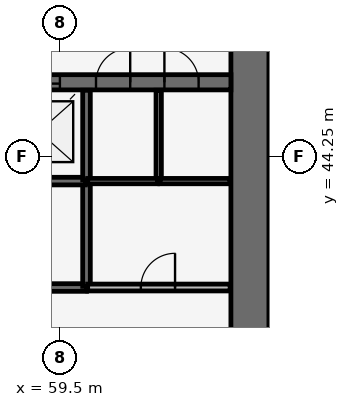
"""IFC4 building model, lengths in metres.
Left out: names, types, materials, properties, quantities, classifications, styles, units other than length and angle.
Written with IfcOpenShell. Run it as: python <this file> out.ifc"""

import sys

from ifc_helpers import new_model, si_unit, direction, frame, frame_2d, origin, place, context, subcontext, project, spatial, rectangle, extrude, source, transform, mapped, element, fill, save


model = new_model("IFC4")
c1 = context("Model", 3, precision=1e-05, world=origin(), true_north=direction((0.0, 1.0)))
c2 = subcontext(c1, "Body", "Model", "MODEL_VIEW")
j1 = project(units=[si_unit("LENGTHUNIT", "METRE"), si_unit("PLANEANGLEUNIT", "RADIAN")], contexts=[c1])
p1 = place(None, origin())
s1 = spatial("IfcSite", under=j1, at=p1, CompositionType="ELEMENT")
p2 = place(p1, origin())
s2 = spatial("IfcBuilding", under=s1, at=p2, CompositionType="ELEMENT")
p3 = place(p2, origin())
s3 = spatial("IfcBuildingStorey", under=s2, at=p3, CompositionType="ELEMENT", Elevation=0.0)
p4 = place(p3, frame((64.5, 38.0, -0.35), z_axis=(0.0, 0.0, 1.0), x_axis=(0.0, 1.0, 0.0)))
e1 = element("IfcWall", 1, at=p4, inside=s3, PredefinedType="SHEAR", context=c2, shape_type="SweptSolid", body=[
    extrude(rectangle(XDim=20.0, YDim=1.0, at=frame_2d((10.0, 0.0))), origin(), (0.0, 0.0, 1.0), 5.35),
])
p5 = place(p4, frame((9.1, 0.0, 0.35)))
e2 = element("IfcOpeningElement", 2, at=p5, cuts=e1, PredefinedType="OPENING", context=c2, shape_type="SweptSolid", body=[
    extrude(rectangle(XDim=1.8, YDim=2.1, at=frame_2d((0.9, 1.05))), frame((0.0, 0.51, 0.0), z_axis=(0.0, -1.0, 0.0), x_axis=(1.0, 0.0, 0.0)), (0.0, 0.0, 1.0), 1.02),
])
p6 = place(p3, frame((40.0, 46.2, -0.35), z_axis=(0.0, 0.0, 1.0), x_axis=(1.0, 0.0, 0.0)))
e3 = element("IfcWall", 3, at=p6, inside=s3, PredefinedType="SHEAR", context=c2, shape_type="SweptSolid", body=[
    extrude(rectangle(XDim=24.0, YDim=0.4, at=frame_2d((12.0, 0.0))), origin(), (0.0, 0.0, 1.0), 5.35),
])
p7 = place(p6, frame((13.4, 0.0, 0.35)))
e4 = element("IfcOpeningElement", 4, at=p7, cuts=e3, PredefinedType="OPENING", context=c2, shape_type="SweptSolid", body=[
    extrude(rectangle(XDim=1.1, YDim=2.1, at=frame_2d((0.55, 1.05))), frame((0.0, 0.21, 0.0), z_axis=(0.0, -1.0, 0.0), x_axis=(1.0, 0.0, 0.0)), (0.0, 0.0, 1.0), 0.42),
])
p8 = place(p6, frame((15.9, 0.0, 0.35)))
e5 = element("IfcOpeningElement", 5, at=p8, cuts=e3, PredefinedType="OPENING", context=c2, shape_type="SweptSolid", body=[
    extrude(rectangle(XDim=1.1, YDim=2.1, at=frame_2d((0.55, 1.05))), frame((0.0, 0.21, 0.0), z_axis=(0.0, -1.0, 0.0), x_axis=(1.0, 0.0, 0.0)), (0.0, 0.0, 1.0), 0.42),
])
p9 = place(p6, frame((18.4, 0.0, 0.35)))
e6 = element("IfcOpeningElement", 6, at=p9, cuts=e3, PredefinedType="OPENING", context=c2, shape_type="SweptSolid", body=[
    extrude(rectangle(XDim=1.1, YDim=2.1, at=frame_2d((0.55, 1.05))), frame((0.0, 0.21, 0.0), z_axis=(0.0, -1.0, 0.0), x_axis=(1.0, 0.0, 0.0)), (0.0, 0.0, 1.0), 0.42),
])
p10 = place(p6, frame((4.5, 0.0, 0.35)))
e7 = element("IfcOpeningElement", 7, at=p10, cuts=e3, PredefinedType="OPENING", context=c2, shape_type="SweptSolid", body=[
    extrude(rectangle(XDim=1.1, YDim=2.1, at=frame_2d((0.55, 1.05))), frame((0.0, 0.21, 0.0), z_axis=(0.0, -1.0, 0.0), x_axis=(1.0, 0.0, 0.0)), (0.0, 0.0, 1.0), 0.42),
])
p11 = place(p6, frame((7.0, 0.0, 0.35)))
e8 = element("IfcOpeningElement", 8, at=p11, cuts=e3, PredefinedType="OPENING", context=c2, shape_type="SweptSolid", body=[
    extrude(rectangle(XDim=1.1, YDim=2.1, at=frame_2d((0.55, 1.05))), frame((0.0, 0.21, 0.0), z_axis=(0.0, -1.0, 0.0), x_axis=(1.0, 0.0, 0.0)), (0.0, 0.0, 1.0), 0.42),
])
p12 = place(p6, frame((9.5, 0.0, 0.35)))
e9 = element("IfcOpeningElement", 9, at=p12, cuts=e3, PredefinedType="OPENING", context=c2, shape_type="SweptSolid", body=[
    extrude(rectangle(XDim=1.1, YDim=2.1, at=frame_2d((0.55, 1.05))), frame((0.0, 0.21, 0.0), z_axis=(0.0, -1.0, 0.0), x_axis=(1.0, 0.0, 0.0)), (0.0, 0.0, 1.0), 0.42),
])
p13 = place(p6, frame((20.45, 0.0, 0.35)))
e10 = element("IfcOpeningElement", 10, at=p13, cuts=e3, PredefinedType="OPENING", context=c2, shape_type="SweptSolid", body=[
    extrude(rectangle(XDim=0.9, YDim=2.1, at=frame_2d((0.45, 1.05))), frame((0.0, 0.21, 0.0), z_axis=(0.0, -1.0, 0.0), x_axis=(1.0, 0.0, 0.0)), (0.0, 0.0, 1.0), 0.42),
])
p14 = place(p6, frame((22.25, 0.0, 0.35)))
e11 = element("IfcOpeningElement", 11, at=p14, cuts=e3, PredefinedType="OPENING", context=c2, shape_type="SweptSolid", body=[
    extrude(rectangle(XDim=0.9, YDim=2.1, at=frame_2d((0.45, 1.05))), frame((0.0, 0.21, 0.0), z_axis=(0.0, -1.0, 0.0), x_axis=(1.0, 0.0, 0.0)), (0.0, 0.0, 1.0), 0.42),
])
p15 = place(p6, frame((0.85, 0.0, 0.35)))
e12 = element("IfcOpeningElement", 12, at=p15, cuts=e3, PredefinedType="OPENING", context=c2, shape_type="SweptSolid", body=[
    extrude(rectangle(XDim=0.9, YDim=2.1, at=frame_2d((0.45, 1.05))), frame((0.0, 0.21, 0.0), z_axis=(0.0, -1.0, 0.0), x_axis=(1.0, 0.0, 0.0)), (0.0, 0.0, 1.0), 0.42),
])
p16 = place(p6, frame((2.65, 0.0, 0.35)))
e13 = element("IfcOpeningElement", 13, at=p16, cuts=e3, PredefinedType="OPENING", context=c2, shape_type="SweptSolid", body=[
    extrude(rectangle(XDim=0.9, YDim=2.1, at=frame_2d((0.45, 1.05))), frame((0.0, 0.21, 0.0), z_axis=(0.0, -1.0, 0.0), x_axis=(1.0, 0.0, 0.0)), (0.0, 0.0, 1.0), 0.42),
])
p17 = place(p6, frame((11.65, 0.0, 0.35)))
e14 = element("IfcOpeningElement", 14, at=p17, cuts=e3, PredefinedType="OPENING", context=c2, shape_type="SweptSolid", body=[
    extrude(rectangle(XDim=0.9, YDim=2.1, at=frame_2d((0.45, 1.05))), frame((0.0, 0.21, 0.0), z_axis=(0.0, -1.0, 0.0), x_axis=(1.0, 0.0, 0.0)), (0.0, 0.0, 1.0), 0.42),
])
p18 = place(p3, frame((53.6, 40.8, 0.0), z_axis=(0.0, 0.0, 1.0), x_axis=(1.0, 0.0, 0.0)))
e15 = element("IfcWall", 15, at=p18, inside=s3, PredefinedType="SOLIDWALL", context=c2, shape_type="SweptSolid", body=[
    extrude(rectangle(XDim=6.6, YDim=0.2, at=frame_2d((3.3, 0.0))), origin(), (0.0, 0.0, 1.0), 4.65),
])
p19 = place(p18, frame((0.3, 0.0, 0.0)))
e16 = element("IfcOpeningElement", 16, at=p19, cuts=e15, PredefinedType="OPENING", context=c2, shape_type="SweptSolid", body=[
    extrude(rectangle(XDim=1.2, YDim=2.1, at=frame_2d((0.6, 1.05))), frame((0.0, 0.11, 0.0), z_axis=(0.0, -1.0, 0.0), x_axis=(1.0, 0.0, 0.0)), (0.0, 0.0, 1.0), 0.22),
])
p20 = place(p3, frame((60.2, 40.83, 0.0), z_axis=(0.0, 0.0, 1.0), x_axis=(0.0, 1.0, 0.0)))
e17 = element("IfcWall", 17, at=p20, inside=s3, PredefinedType="SOLIDWALL", context=c2, shape_type="SweptSolid", body=[
    extrude(rectangle(XDim=2.77, YDim=0.2, at=frame_2d((1.385, 0.0))), origin(), (0.0, 0.0, 1.0), 4.65),
])
p21 = place(p3, frame((57.73, 43.6, 0.0), z_axis=(0.0, 0.0, 1.0), x_axis=(1.0, 0.0, 0.0)))
e18 = element("IfcWall", 18, at=p21, inside=s3, PredefinedType="SOLIDWALL", context=c2, shape_type="SweptSolid", body=[
    extrude(rectangle(XDim=2.44, YDim=0.2, at=frame_2d((1.22, 0.0))), origin(), (0.0, 0.0, 1.0), 4.65),
])
p22 = place(p3, frame((60.2, 43.63, 0.0), z_axis=(0.0, 0.0, 1.0), x_axis=(0.0, 1.0, 0.0)))
e19 = element("IfcWall", 19, at=p22, inside=s3, PredefinedType="SOLIDWALL", context=c2, shape_type="SweptSolid", body=[
    extrude(rectangle(XDim=2.36, YDim=0.2, at=frame_2d((1.18, 0.0))), origin(), (0.0, 0.0, 1.0), 4.65),
])
p23 = place(p3, frame((60.23, 40.8, 0.0), z_axis=(0.0, 0.0, 1.0), x_axis=(1.0, 0.0, 0.0)))
e20 = element("IfcWall", 20, at=p23, inside=s3, PredefinedType="PARTITIONING", context=c2, shape_type="SweptSolid", body=[
    extrude(rectangle(XDim=3.75, YDim=0.18, at=frame_2d((1.875, 0.0))), origin(), (0.0, 0.0, 1.0), 4.65),
])
p24 = place(p23, frame((1.4, 0.0, 0.0)))
e21 = element("IfcOpeningElement", 21, at=p24, cuts=e20, PredefinedType="OPENING", context=c2, shape_type="SweptSolid", body=[
    extrude(rectangle(XDim=0.9, YDim=2.1, at=frame_2d((0.45, 1.05))), frame((0.0, 0.1, 0.0), z_axis=(0.0, -1.0, 0.0), x_axis=(1.0, 0.0, 0.0)), (0.0, 0.0, 1.0), 0.2),
])
p25 = place(p3, frame((62.1, 43.6, 0.0), z_axis=(0.0, 0.0, 1.0), x_axis=(0.0, 1.0, 0.0)))
e22 = element("IfcWall", 22, at=p25, inside=s3, PredefinedType="PARTITIONING", context=c2, shape_type="SweptSolid", body=[
    extrude(rectangle(XDim=2.39, YDim=0.14, at=frame_2d((1.195, 0.0))), origin(), (0.0, 0.0, 1.0), 3.85),
])
p26 = place(p3, frame((60.23, 43.6, 0.0), z_axis=(0.0, 0.0, 1.0), x_axis=(1.0, 0.0, 0.0)))
e23 = element("IfcWall", 23, at=p26, inside=s3, PredefinedType="PARTITIONING", context=c2, shape_type="SweptSolid", body=[
    extrude(rectangle(XDim=1.84, YDim=0.14, at=frame_2d((0.92, 0.0))), origin(), (0.0, 0.0, 1.0), 3.85),
])
p27 = place(p3, frame((62.13, 43.6, 0.0), z_axis=(0.0, 0.0, 1.0), x_axis=(1.0, 0.0, 0.0)))
e24 = element("IfcWall", 24, at=p27, inside=s3, PredefinedType="PARTITIONING", context=c2, shape_type="SweptSolid", body=[
    extrude(rectangle(XDim=1.85, YDim=0.14, at=frame_2d((0.925, 0.0))), origin(), (0.0, 0.0, 1.0), 3.85),
])
m1 = source(origin(), c2, "Body", "SweptSolid", [
    extrude(rectangle(XDim=1.1, YDim=2.1, at=frame_2d((0.55, 1.05))), frame((0.0, 0.025, 0.0), z_axis=(0.0, -1.0, 0.0), x_axis=(1.0, 0.0, 0.0)), (0.0, 0.0, 1.0), 0.05),
])
p28 = place(p9, origin())
e25 = element("IfcDoor", 25, at=p28, inside=s3, OperationType="DOUBLE_DOOR_SLIDING", PredefinedType="USERDEFINED", context=c2, shape_type="MappedRepresentation", body=[
    mapped(m1, transform((0.0, 0.0, 0.0), scale=1.0)),
])
fill(e6, e25)
m2 = source(origin(), c2, "Body", "SweptSolid", [
    extrude(rectangle(XDim=0.9, YDim=2.1, at=frame_2d((0.45, 1.05))), frame((0.0, 0.025, 0.0), z_axis=(0.0, -1.0, 0.0), x_axis=(1.0, 0.0, 0.0)), (0.0, 0.0, 1.0), 0.05),
])
p29 = place(p13, origin())
e26 = element("IfcDoor", 26, at=p29, inside=s3, OperationType="SINGLE_SWING_RIGHT", PredefinedType="DOOR", context=c2, shape_type="MappedRepresentation", body=[
    mapped(m2, transform((0.0, 0.0, 0.0), scale=1.0)),
])
fill(e10, e26)
p30 = place(p14, origin())
e27 = element("IfcDoor", 27, at=p30, inside=s3, OperationType="SINGLE_SWING_LEFT", PredefinedType="DOOR", context=c2, shape_type="MappedRepresentation", body=[
    mapped(m2, transform((0.0, 0.0, 0.0), scale=1.0)),
])
fill(e11, e27)
p31 = place(p24, origin())
e28 = element("IfcDoor", 28, at=p31, inside=s3, OperationType="SINGLE_SWING_RIGHT", PredefinedType="DOOR", context=c2, shape_type="MappedRepresentation", body=[
    mapped(m2, transform((0.0, 0.0, 0.0), scale=1.0)),
])
fill(e21, e28)
save(model, sys.argv[1])
